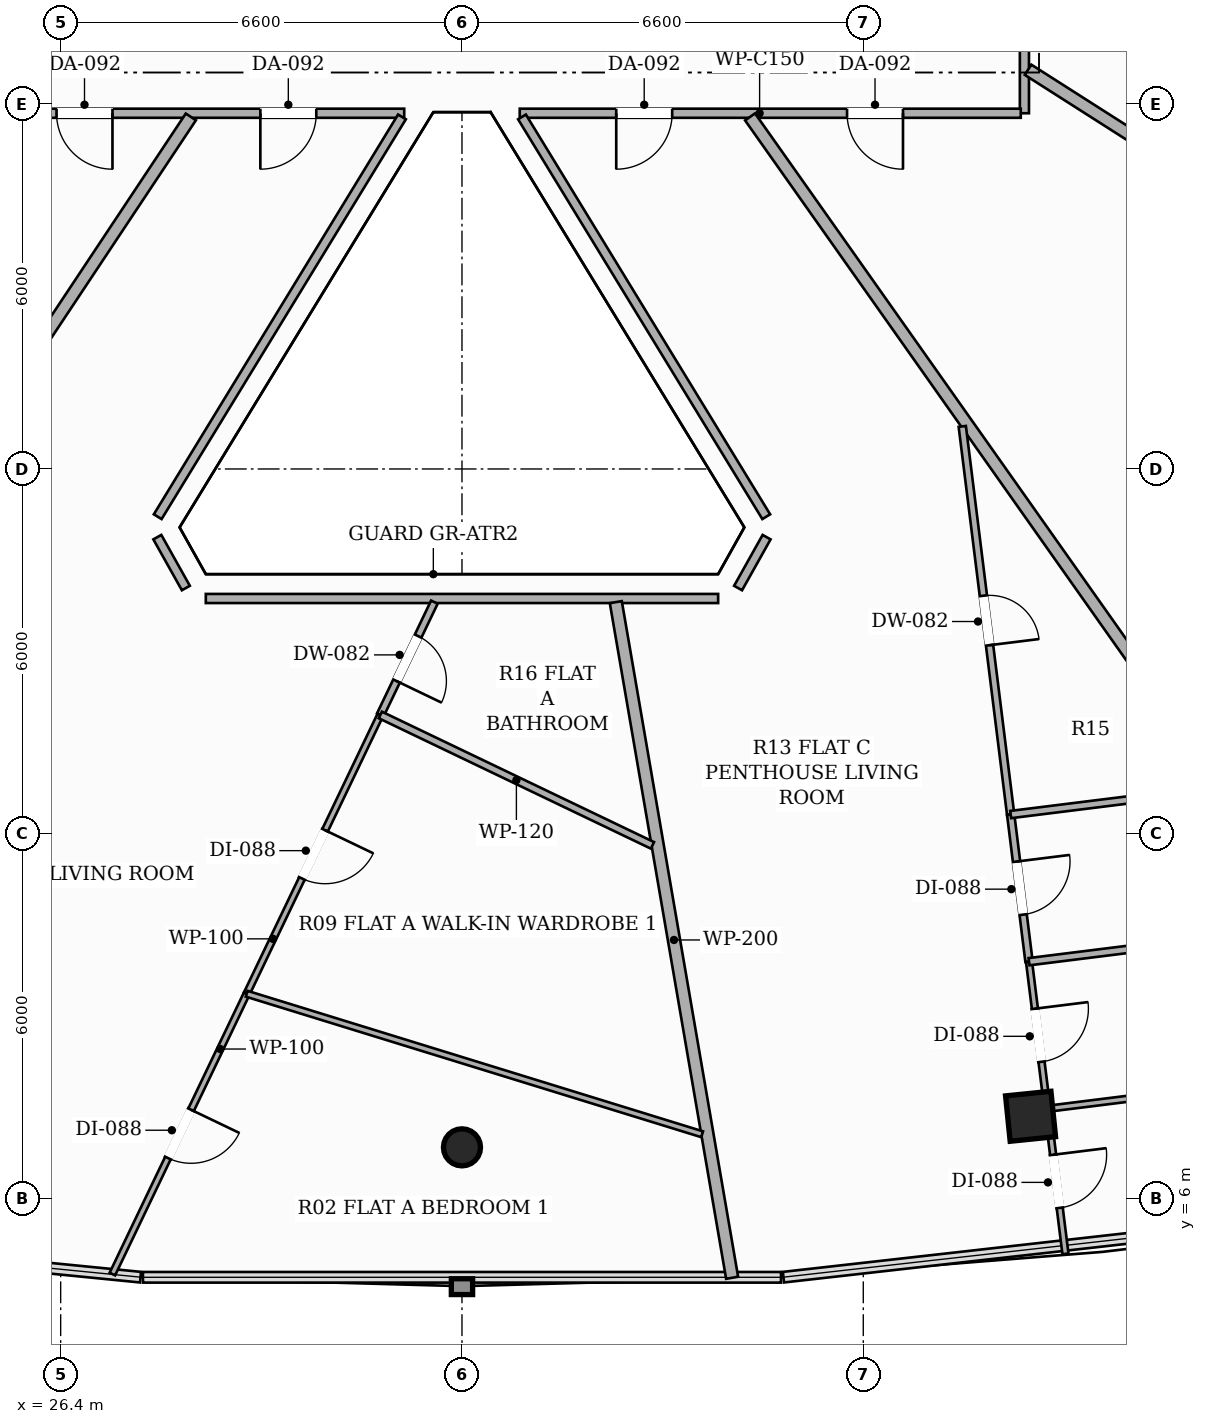
"""IFC4 building model, lengths in metres.
Left out: names, types, materials, properties, quantities, classifications, styles, units other than length and angle.
Written with IfcOpenShell. Run it as: python <this file> out.ifc"""

import sys

from ifc_helpers import new_model, si_unit, direction, frame, frame_2d, origin, origin_2d, place, context, subcontext, project, spatial, rectangle, hollow_rectangle, hollow_circle, extrude, element, fill, save


model = new_model("IFC4")
c1 = context("Model", 3, precision=1e-05, world=origin(), true_north=direction((0.0, 1.0)))
c2 = subcontext(c1, "Body", "Model", "MODEL_VIEW")
j1 = project(units=[si_unit("LENGTHUNIT", "METRE"), si_unit("PLANEANGLEUNIT", "RADIAN")], contexts=[c1])
p1 = place(None, origin())
s1 = spatial("IfcSite", under=j1, at=p1, CompositionType="ELEMENT")
p2 = place(p1, origin())
s2 = spatial("IfcBuilding", under=s1, at=p2, CompositionType="ELEMENT")
p3 = place(p2, frame((0.0, 0.0, 212.9)))
s3 = spatial("IfcBuildingStorey", under=s2, at=p3, CompositionType="ELEMENT", Elevation=212.9)
p4 = place(p3, frame((33.0, 6.844, 0.0), z_axis=(0.0, 0.0, 1.0), x_axis=(1.0, 0.0, 0.0)))
e1 = element("IfcColumn", 1, at=p4, inside=s3, PredefinedType="COLUMN", context=c2, shape_type="SweptSolid", body=[
    extrude(hollow_circle(Radius=0.305, WallThickness=0.016, at=origin_2d()), origin(), (0.0, 0.0, 1.0), 3.3),
])
p5 = place(p3, frame((42.351, 7.355, 0.0), z_axis=(0.0, 0.0, 1.0), x_axis=(0.994880708829, 0.101056297183, 0.0)))
e2 = element("IfcColumn", 2, at=p5, inside=s3, PredefinedType="COLUMN", context=c2, shape_type="SweptSolid", body=[
    extrude(hollow_rectangle(XDim=0.75, YDim=0.75, WallThickness=0.025, at=origin_2d()), origin(), (0.0, 0.0, 1.0), 3.3),
])
p6 = place(p3, frame((32.05, 23.85, 0.0), z_axis=(0.0, 0.0, 1.0), x_axis=(-1.0, 0.0, 0.0)))
e3 = element("IfcWall", 3, at=p6, inside=s3, PredefinedType="PARTITIONING", context=c2, shape_type="SweptSolid", body=[
    extrude(rectangle(XDim=8.4, YDim=0.15, at=frame_2d((4.2, 0.0))), origin(), (0.0, 0.0, 1.0), 2.565),
])
p7 = place(p6, frame((1.446, 0.0, 0.0)))
e4 = element("IfcOpeningElement", 4, at=p7, cuts=e3, PredefinedType="OPENING", context=c2, shape_type="SweptSolid", body=[
    extrude(rectangle(XDim=0.92, YDim=2.15, at=frame_2d((0.46, 1.075))), frame((0.0, 0.085, 0.0), z_axis=(0.0, -1.0, 0.0), x_axis=(1.0, 0.0, 0.0)), (0.0, 0.0, 1.0), 0.17),
])
p8 = place(p6, frame((4.798, 0.0, 0.0)))
e5 = element("IfcOpeningElement", 5, at=p8, cuts=e3, PredefinedType="OPENING", context=c2, shape_type="SweptSolid", body=[
    extrude(rectangle(XDim=0.92, YDim=2.15, at=frame_2d((0.46, 1.075))), frame((0.0, 0.085, 0.0), z_axis=(0.0, -1.0, 0.0), x_axis=(1.0, 0.0, 0.0)), (0.0, 0.0, 1.0), 0.17),
])
p9 = place(p3, frame((42.25, 26.59, 0.0), z_axis=(0.0, 0.0, 1.0), x_axis=(0.0, -1.0, 0.0)))
e6 = element("IfcWall", 6, at=p9, inside=s3, PredefinedType="PARTITIONING", context=c2, shape_type="SweptSolid", body=[
    extrude(rectangle(XDim=2.74, YDim=0.15, at=frame_2d((1.37, 0.0))), origin(), (0.0, 0.0, 1.0), 2.773),
])
p10 = place(p3, frame((42.19, 23.85, 0.0), z_axis=(0.0, 0.0, 1.0), x_axis=(-1.0, 0.0, 0.0)))
e7 = element("IfcWall", 7, at=p10, inside=s3, PredefinedType="PARTITIONING", context=c2, shape_type="SweptSolid", body=[
    extrude(rectangle(XDim=8.24, YDim=0.15, at=frame_2d((4.12, 0.0))), origin(), (0.0, 0.0, 1.0), 2.565),
])
p11 = place(p10, frame((1.937, 0.0, 0.0)))
e8 = element("IfcOpeningElement", 8, at=p11, cuts=e7, PredefinedType="OPENING", context=c2, shape_type="SweptSolid", body=[
    extrude(rectangle(XDim=0.92, YDim=2.15, at=frame_2d((0.46, 1.075))), frame((0.0, 0.085, 0.0), z_axis=(0.0, -1.0, 0.0), x_axis=(1.0, 0.0, 0.0)), (0.0, 0.0, 1.0), 0.17),
])
p12 = place(p10, frame((5.733, 0.0, 0.0)))
e9 = element("IfcOpeningElement", 9, at=p12, cuts=e7, PredefinedType="OPENING", context=c2, shape_type="SweptSolid", body=[
    extrude(rectangle(XDim=0.92, YDim=2.15, at=frame_2d((0.46, 1.075))), frame((0.0, 0.085, 0.0), z_axis=(0.0, -1.0, 0.0), x_axis=(1.0, 0.0, 0.0)), (0.0, 0.0, 1.0), 0.17),
])
p13 = place(p3, frame((33.987, 23.79, 0.0), z_axis=(0.0, 0.0, 1.0), x_axis=(0.521338496894, -0.853349970209, 0.0)))
e10 = element("IfcWall", 10, at=p13, inside=s3, PredefinedType="PARTITIONING", context=c2, shape_type="SweptSolid", body=[
    extrude(rectangle(XDim=7.705, YDim=0.15, at=frame_2d((3.853, 0.0))), origin(), (0.0, 0.0, 1.0), 2.773),
])
p14 = place(p3, frame((38.01, 16.879, 0.0), z_axis=(0.0, 0.0, 1.0), x_axis=(-0.488859069364, -0.872362774481, 0.0)))
e11 = element("IfcWall", 11, at=p14, inside=s3, PredefinedType="PARTITIONING", context=c2, shape_type="SweptSolid", body=[
    extrude(rectangle(XDim=0.959, YDim=0.15, at=frame_2d((0.48, 0.0))), origin(), (0.0, 0.0, 1.0), 3.06),
])
p15 = place(p3, frame((37.213, 15.87, 0.0), z_axis=(0.0, 0.0, 1.0), x_axis=(-1.0, 0.0, 0.0)))
e12 = element("IfcWall", 12, at=p15, inside=s3, PredefinedType="PARTITIONING", context=c2, shape_type="SweptSolid", body=[
    extrude(rectangle(XDim=8.426, YDim=0.15, at=frame_2d((4.213, 0.0))), origin(), (0.0, 0.0, 1.0), 2.773),
])
p16 = place(p3, frame((28.459, 16.042, 0.0), z_axis=(0.0, 0.0, 1.0), x_axis=(-0.488859069364, 0.872362774481, 0.0)))
e13 = element("IfcWall", 13, at=p16, inside=s3, PredefinedType="PARTITIONING", context=c2, shape_type="SweptSolid", body=[
    extrude(rectangle(XDim=0.959, YDim=0.15, at=frame_2d((0.48, 0.0))), origin(), (0.0, 0.0, 1.0), 3.06),
])
p17 = place(p3, frame((27.996, 17.215, 0.0), z_axis=(0.0, 0.0, 1.0), x_axis=(0.521338496894, 0.853349970209, 0.0)))
e14 = element("IfcWall", 14, at=p17, inside=s3, PredefinedType="PARTITIONING", context=c2, shape_type="SweptSolid", body=[
    extrude(rectangle(XDim=7.705, YDim=0.15, at=frame_2d((3.853, 0.0))), origin(), (0.0, 0.0, 1.0), 2.773),
])
p18 = place(p3, frame((35.53, 15.81, 0.0), z_axis=(0.0, 0.0, 1.0), x_axis=(0.169681394536, -0.985498972272, 0.0)))
e15 = element("IfcWall", 15, at=p18, inside=s3, PredefinedType="PARTITIONING", context=c2, shape_type="SweptSolid", body=[
    extrude(rectangle(XDim=11.275, YDim=0.2, at=frame_2d((5.637, 0.0))), origin(), (0.0, 0.0, 1.0), 2.492),
])
p19 = place(p3, frame((16.618, 5.846, 0.0), z_axis=(0.0, 0.0, 1.0), x_axis=(0.553425992232, 0.832898355817, 0.0)))
e16 = element("IfcWall", 16, at=p19, inside=s3, PredefinedType="PARTITIONING", context=c2, shape_type="SweptSolid", body=[
    extrude(rectangle(XDim=21.544, YDim=0.2, at=frame_2d((10.772, 0.0))), origin(), (0.0, 0.0, 1.0), 2.492),
])
p20 = place(p3, frame((50.316, 5.976, 0.0), z_axis=(0.0, 0.0, 1.0), x_axis=(-0.576784728977, 0.816896184603, 0.0)))
e17 = element("IfcWall", 17, at=p20, inside=s3, PredefinedType="PARTITIONING", context=c2, shape_type="SweptSolid", body=[
    extrude(rectangle(XDim=21.807, YDim=0.2, at=frame_2d((10.903, 0.0))), origin(), (0.0, 0.0, 1.0), 2.492),
])
p21 = place(p3, frame((42.31, 24.565, 0.0), z_axis=(0.0, 0.0, 1.0), x_axis=(0.843209388644, -0.537585274075, 0.0)))
e18 = element("IfcWall", 18, at=p21, inside=s3, PredefinedType="PARTITIONING", context=c2, shape_type="SweptSolid", body=[
    extrude(rectangle(XDim=12.816, YDim=0.2, at=frame_2d((6.408, 0.0))), origin(), (0.0, 0.0, 1.0), 2.492),
])
p22 = place(p3, frame((32.546, 15.81, 0.0), z_axis=(0.0, 0.0, 1.0), x_axis=(-0.43214833388, -0.90180253799, 0.0)))
e19 = element("IfcWall", 19, at=p22, inside=s3, PredefinedType="PARTITIONING", context=c2, shape_type="SweptSolid", body=[
    extrude(rectangle(XDim=2.057, YDim=0.12, at=frame_2d((1.028, 0.0))), origin(), (0.0, 0.0, 1.0), 3.06),
])
p23 = place(p22, frame((0.619, 0.0, 0.0)))
e20 = element("IfcOpeningElement", 20, at=p23, cuts=e19, PredefinedType="OPENING", context=c2, shape_type="SweptSolid", body=[
    extrude(rectangle(XDim=0.82, YDim=2.1, at=frame_2d((0.41, 1.05))), frame((0.0, 0.07, 0.0), z_axis=(0.0, -1.0, 0.0), x_axis=(1.0, 0.0, 0.0)), (0.0, 0.0, 1.0), 0.14),
])
p24 = place(p3, frame((29.459, 9.37, 0.0), z_axis=(0.0, 0.0, 1.0), x_axis=(-0.43211613455, -0.901817967364, 0.0)))
e21 = element("IfcWall", 21, at=p24, inside=s3, PredefinedType="PARTITIONING", context=c2, shape_type="SweptSolid", body=[
    extrude(rectangle(XDim=5.112, YDim=0.1, at=frame_2d((2.556, 0.0))), origin(), (0.0, 0.0, 1.0), 2.492),
])
p25 = place(p24, frame((2.116, 0.0, 0.0)))
e22 = element("IfcOpeningElement", 22, at=p25, cuts=e21, PredefinedType="OPENING", context=c2, shape_type="SweptSolid", body=[
    extrude(rectangle(XDim=0.88, YDim=2.1, at=frame_2d((0.44, 1.05))), frame((0.0, 0.06, 0.0), z_axis=(0.0, -1.0, 0.0), x_axis=(1.0, 0.0, 0.0)), (0.0, 0.0, 1.0), 0.12),
])
p26 = place(p3, frame((31.657, 13.955, 0.0), z_axis=(0.0, 0.0, 1.0), x_axis=(-0.4322861352, -0.901736489954, 0.0)))
e23 = element("IfcWall", 23, at=p26, inside=s3, PredefinedType="PARTITIONING", context=c2, shape_type="SweptSolid", body=[
    extrude(rectangle(XDim=5.084, YDim=0.1, at=frame_2d((2.542, 0.0))), origin(), (0.0, 0.0, 1.0), 3.06),
])
p27 = place(p26, frame((2.102, 0.0, 0.0)))
e24 = element("IfcOpeningElement", 24, at=p27, cuts=e23, PredefinedType="OPENING", context=c2, shape_type="SweptSolid", body=[
    extrude(rectangle(XDim=0.88, YDim=2.1, at=frame_2d((0.44, 1.05))), frame((0.0, 0.06, 0.0), z_axis=(0.0, -1.0, 0.0), x_axis=(1.0, 0.0, 0.0)), (0.0, 0.0, 1.0), 0.12),
])
p28 = place(p3, frame((36.133, 11.81, 0.0), z_axis=(0.0, 0.0, 1.0), x_axis=(-0.901797658679, 0.432158515826, 0.0)))
e25 = element("IfcWall", 25, at=p28, inside=s3, PredefinedType="PARTITIONING", context=c2, shape_type="SweptSolid", body=[
    extrude(rectangle(XDim=4.964, YDim=0.12, at=frame_2d((2.482, 0.0))), origin(), (0.0, 0.0, 1.0), 2.773),
])
p29 = place(p3, frame((29.459, 9.37, 0.0), z_axis=(0.0, 0.0, 1.0), x_axis=(0.955559226726, -0.294799193044, 0.0)))
e26 = element("IfcWall", 26, at=p29, inside=s3, PredefinedType="PARTITIONING", context=c2, shape_type="SweptSolid", body=[
    extrude(rectangle(XDim=7.839, YDim=0.1, at=frame_2d((3.92, 0.0))), origin(), (0.0, 0.0, 1.0), 2.492),
])
p30 = place(p3, frame((41.228, 18.7, 0.0), z_axis=(0.0, 0.0, 1.0), x_axis=(0.123731094195, -0.992315784581, 0.0)))
e27 = element("IfcWall", 27, at=p30, inside=s3, PredefinedType="PARTITIONING", context=c2, shape_type="SweptSolid", body=[
    extrude(rectangle(XDim=6.432, YDim=0.12, at=frame_2d((3.216, 0.0))), origin(), (0.0, 0.0, 1.0), 3.06),
])
p31 = place(p30, frame((2.806, 0.0, 0.0)))
e28 = element("IfcOpeningElement", 28, at=p31, cuts=e27, PredefinedType="OPENING", context=c2, shape_type="SweptSolid", body=[
    extrude(rectangle(XDim=0.82, YDim=2.1, at=frame_2d((0.41, 1.05))), frame((0.0, 0.07, 0.0), z_axis=(0.0, -1.0, 0.0), x_axis=(1.0, 0.0, 0.0)), (0.0, 0.0, 1.0), 0.14),
])
p32 = place(p3, frame((42.024, 12.317, 0.0), z_axis=(0.0, 0.0, 1.0), x_axis=(0.123837590029, -0.992302499894, 0.0)))
e29 = element("IfcWall", 29, at=p32, inside=s3, PredefinedType="PARTITIONING", context=c2, shape_type="SweptSolid", body=[
    extrude(rectangle(XDim=2.439, YDim=0.12, at=frame_2d((1.219, 0.0))), origin(), (0.0, 0.0, 1.0), 3.06),
])
p33 = place(p32, frame((0.779, 0.0, 0.0)))
e30 = element("IfcOpeningElement", 30, at=p33, cuts=e29, PredefinedType="OPENING", context=c2, shape_type="SweptSolid", body=[
    extrude(rectangle(XDim=0.88, YDim=2.1, at=frame_2d((0.44, 1.05))), frame((0.0, 0.07, 0.0), z_axis=(0.0, -1.0, 0.0), x_axis=(1.0, 0.0, 0.0)), (0.0, 0.0, 1.0), 0.14),
])
p34 = place(p3, frame((42.628, 7.478, 0.0), z_axis=(0.0, 0.0, 1.0), x_axis=(0.123572330504, -0.992335567806, 0.0)))
e31 = element("IfcWall", 31, at=p34, inside=s3, PredefinedType="PARTITIONING", context=c2, shape_type="SweptSolid", body=[
    extrude(rectangle(XDim=2.404, YDim=0.1, at=frame_2d((1.202, 0.0))), origin(), (0.0, 0.0, 1.0), 2.492),
])
p35 = place(p34, frame((0.762, 0.0, 0.0)))
e32 = element("IfcOpeningElement", 32, at=p35, cuts=e31, PredefinedType="OPENING", context=c2, shape_type="SweptSolid", body=[
    extrude(rectangle(XDim=0.88, YDim=2.1, at=frame_2d((0.44, 1.05))), frame((0.0, 0.06, 0.0), z_axis=(0.0, -1.0, 0.0), x_axis=(1.0, 0.0, 0.0)), (0.0, 0.0, 1.0), 0.12),
])
p36 = place(p3, frame((42.326, 9.897, 0.0), z_axis=(0.0, 0.0, 1.0), x_axis=(0.123886817851, -0.992296355109, 0.0)))
e33 = element("IfcWall", 33, at=p36, inside=s3, PredefinedType="PARTITIONING", context=c2, shape_type="SweptSolid", body=[
    extrude(rectangle(XDim=2.438, YDim=0.1, at=frame_2d((1.219, 0.0))), origin(), (0.0, 0.0, 1.0), 2.492),
])
p37 = place(p36, frame((0.779, 0.0, 0.0)))
e34 = element("IfcOpeningElement", 34, at=p37, cuts=e33, PredefinedType="OPENING", context=c2, shape_type="SweptSolid", body=[
    extrude(rectangle(XDim=0.88, YDim=2.1, at=frame_2d((0.44, 1.05))), frame((0.0, 0.06, 0.0), z_axis=(0.0, -1.0, 0.0), x_axis=(1.0, 0.0, 0.0)), (0.0, 0.0, 1.0), 0.12),
])
p38 = place(p3, frame((45.435, 12.742, 0.0), z_axis=(0.0, 0.0, 1.0), x_axis=(-0.99232587892, -0.123650111308, 0.0)))
e35 = element("IfcWall", 35, at=p38, inside=s3, PredefinedType="PARTITIONING", context=c2, shape_type="SweptSolid", body=[
    extrude(rectangle(XDim=3.438, YDim=0.12, at=frame_2d((1.719, 0.0))), origin(), (0.0, 0.0, 1.0), 2.773),
])
p39 = place(p3, frame((47.029, 10.484, 0.0), z_axis=(0.0, 0.0, 1.0), x_axis=(-0.992303215116, -0.123831858863, 0.0)))
e36 = element("IfcWall", 36, at=p39, inside=s3, PredefinedType="PARTITIONING", context=c2, shape_type="SweptSolid", body=[
    extrude(rectangle(XDim=4.74, YDim=0.12, at=frame_2d((2.37, 0.0))), origin(), (0.0, 0.0, 1.0), 2.773),
])
p40 = place(p3, frame((42.628, 7.478, 0.0), z_axis=(0.0, 0.0, 1.0), x_axis=(0.992305206969, 0.123815896488, 0.0)))
e37 = element("IfcWall", 37, at=p40, inside=s3, PredefinedType="PARTITIONING", context=c2, shape_type="SweptSolid", body=[
    extrude(rectangle(XDim=6.042, YDim=0.1, at=frame_2d((3.021, 0.0))), origin(), (0.0, 0.0, 1.0), 2.492),
])
p41 = place(p7, origin())
e38 = element("IfcDoor", 38, at=p41, inside=s3, OperationType="SINGLE_SWING_RIGHT", PredefinedType="DOOR", context=c2, shape_type="SweptSolid", body=[
    extrude(rectangle(XDim=0.92, YDim=2.15, at=frame_2d((0.46, 1.075))), frame((0.0, 0.025, 0.0), z_axis=(0.0, -1.0, 0.0), x_axis=(1.0, 0.0, 0.0)), (0.0, 0.0, 1.0), 0.05),
])
fill(e4, e38)
p42 = place(p23, origin())
e39 = element("IfcDoor", 39, at=p42, inside=s3, OperationType="SINGLE_SWING_RIGHT", PredefinedType="DOOR", context=c2, shape_type="SweptSolid", body=[
    extrude(rectangle(XDim=0.82, YDim=2.1, at=frame_2d((0.41, 1.05))), frame((0.0, 0.025, 0.0), z_axis=(0.0, -1.0, 0.0), x_axis=(1.0, 0.0, 0.0)), (0.0, 0.0, 1.0), 0.05),
])
fill(e20, e39)
p43 = place(p25, origin())
e40 = element("IfcDoor", 40, at=p43, inside=s3, OperationType="SINGLE_SWING_LEFT", PredefinedType="DOOR", context=c2, shape_type="SweptSolid", body=[
    extrude(rectangle(XDim=0.88, YDim=2.1, at=frame_2d((0.44, 1.05))), frame((0.0, 0.025, 0.0), z_axis=(0.0, -1.0, 0.0), x_axis=(1.0, 0.0, 0.0)), (0.0, 0.0, 1.0), 0.05),
])
fill(e22, e40)
p44 = place(p27, origin())
e41 = element("IfcDoor", 41, at=p44, inside=s3, OperationType="SINGLE_SWING_LEFT", PredefinedType="DOOR", context=c2, shape_type="SweptSolid", body=[
    extrude(rectangle(XDim=0.88, YDim=2.1, at=frame_2d((0.44, 1.05))), frame((0.0, 0.025, 0.0), z_axis=(0.0, -1.0, 0.0), x_axis=(1.0, 0.0, 0.0)), (0.0, 0.0, 1.0), 0.05),
])
fill(e24, e41)
p45 = place(p11, origin())
e42 = element("IfcDoor", 42, at=p45, inside=s3, OperationType="SINGLE_SWING_LEFT", PredefinedType="DOOR", context=c2, shape_type="SweptSolid", body=[
    extrude(rectangle(XDim=0.92, YDim=2.15, at=frame_2d((0.46, 1.075))), frame((0.0, 0.025, 0.0), z_axis=(0.0, -1.0, 0.0), x_axis=(1.0, 0.0, 0.0)), (0.0, 0.0, 1.0), 0.05),
])
fill(e8, e42)
p46 = place(p12, origin())
e43 = element("IfcDoor", 43, at=p46, inside=s3, OperationType="SINGLE_SWING_RIGHT", PredefinedType="DOOR", context=c2, shape_type="SweptSolid", body=[
    extrude(rectangle(XDim=0.92, YDim=2.15, at=frame_2d((0.46, 1.075))), frame((0.0, 0.025, 0.0), z_axis=(0.0, -1.0, 0.0), x_axis=(1.0, 0.0, 0.0)), (0.0, 0.0, 1.0), 0.05),
])
fill(e9, e43)
p47 = place(p31, origin())
e44 = element("IfcDoor", 44, at=p47, inside=s3, OperationType="SINGLE_SWING_RIGHT", PredefinedType="DOOR", context=c2, shape_type="SweptSolid", body=[
    extrude(rectangle(XDim=0.82, YDim=2.1, at=frame_2d((0.41, 1.05))), frame((0.0, 0.025, 0.0), z_axis=(0.0, -1.0, 0.0), x_axis=(1.0, 0.0, 0.0)), (0.0, 0.0, 1.0), 0.05),
])
fill(e28, e44)
p48 = place(p33, origin())
e45 = element("IfcDoor", 45, at=p48, inside=s3, OperationType="SINGLE_SWING_LEFT", PredefinedType="DOOR", context=c2, shape_type="SweptSolid", body=[
    extrude(rectangle(XDim=0.88, YDim=2.1, at=frame_2d((0.44, 1.05))), frame((0.0, 0.025, 0.0), z_axis=(0.0, -1.0, 0.0), x_axis=(1.0, 0.0, 0.0)), (0.0, 0.0, 1.0), 0.05),
])
fill(e30, e45)
p49 = place(p35, origin())
e46 = element("IfcDoor", 46, at=p49, inside=s3, OperationType="SINGLE_SWING_LEFT", PredefinedType="DOOR", context=c2, shape_type="SweptSolid", body=[
    extrude(rectangle(XDim=0.88, YDim=2.1, at=frame_2d((0.44, 1.05))), frame((0.0, 0.025, 0.0), z_axis=(0.0, -1.0, 0.0), x_axis=(1.0, 0.0, 0.0)), (0.0, 0.0, 1.0), 0.05),
])
fill(e32, e46)
p50 = place(p37, origin())
e47 = element("IfcDoor", 47, at=p50, inside=s3, OperationType="SINGLE_SWING_LEFT", PredefinedType="DOOR", context=c2, shape_type="SweptSolid", body=[
    extrude(rectangle(XDim=0.88, YDim=2.1, at=frame_2d((0.44, 1.05))), frame((0.0, 0.025, 0.0), z_axis=(0.0, -1.0, 0.0), x_axis=(1.0, 0.0, 0.0)), (0.0, 0.0, 1.0), 0.05),
])
fill(e34, e47)
p51 = place(p8, origin())
e48 = element("IfcDoor", 48, at=p51, inside=s3, OperationType="SINGLE_SWING_LEFT", PredefinedType="DOOR", context=c2, shape_type="SweptSolid", body=[
    extrude(rectangle(XDim=0.92, YDim=2.15, at=frame_2d((0.46, 1.075))), frame((0.0, 0.025, 0.0), z_axis=(0.0, -1.0, 0.0), x_axis=(1.0, 0.0, 0.0)), (0.0, 0.0, 1.0), 0.05),
])
fill(e5, e48)
save(model, sys.argv[1])
